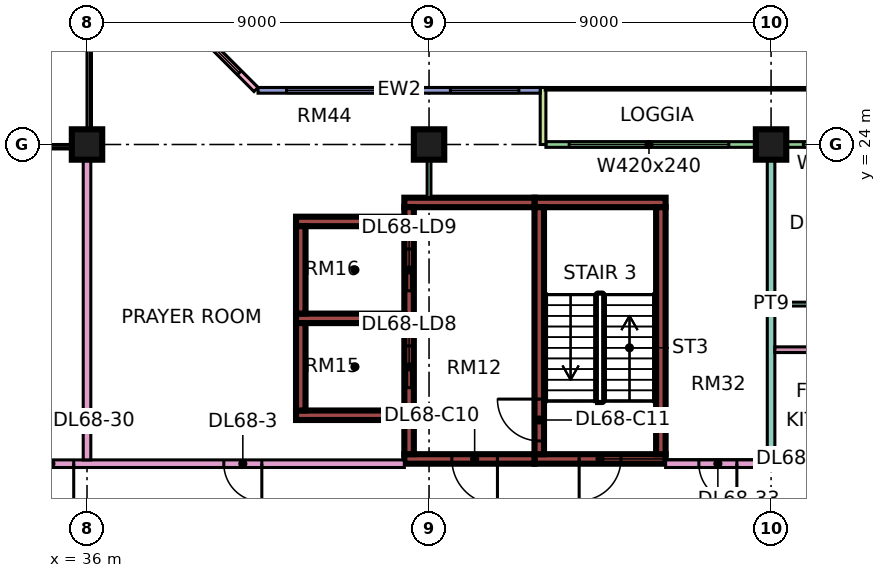
"""IFC4 building model, lengths in metres.
Left out: names, types, materials, properties, quantities, classifications, styles, units other than length and angle.
Written with IfcOpenShell. Run it as: python <this file> out.ifc"""

import sys

from ifc_helpers import new_model, si_unit, direction, frame, frame_2d, origin, origin_2d, place, context, subcontext, project, spatial, rectangle, extrude, element, fill, save


model = new_model("IFC4")
c1 = context("Model", 3, precision=1e-05, world=origin(), true_north=direction((0.0, 1.0)))
c2 = subcontext(c1, "Body", "Model", "MODEL_VIEW")
j1 = project(units=[si_unit("LENGTHUNIT", "METRE"), si_unit("PLANEANGLEUNIT", "RADIAN")], contexts=[c1])
p1 = place(None, origin())
s1 = spatial("IfcSite", under=j1, at=p1, CompositionType="ELEMENT")
p2 = place(p1, origin())
s2 = spatial("IfcBuilding", under=s1, at=p2, CompositionType="ELEMENT")
p3 = place(p2, frame((0.0, 0.0, 292.15)))
s3 = spatial("IfcBuildingStorey", under=s2, at=p3, CompositionType="ELEMENT", Elevation=292.15)
for number, where, z_axis, x_axis in (
    (1, (36.0, 24.0, 0.0), (0.0, 0.0, 1.0), (1.0, 0.0, 0.0)),
    (2, (45.0, 24.0, 0.0), (0.0, 0.0, 1.0), (1.0, 0.0, 0.0)),
    (3, (54.0, 24.0, 0.0), (0.0, 0.0, 1.0), (1.0, 0.0, 0.0)),
):
    element("IfcColumn", number, at=place(p3, frame(where, z_axis=z_axis, x_axis=x_axis)), inside=s3, PredefinedType="COLUMN", context=c2, shape_type="SweptSolid", body=[
        extrude(rectangle(XDim=0.8, YDim=0.8, at=origin_2d()), origin(), (0.0, 0.0, 1.0), 3.75),
    ])
p4 = place(p3, frame((47.775, 15.725, 0.0), z_axis=(0.0, 0.0, 1.0), x_axis=(1.0, 0.0, 0.0)))
e4 = element("IfcWall", 4, at=p4, inside=s3, PredefinedType="SHEAR", context=c2, shape_type="SweptSolid", body=[
    extrude(rectangle(XDim=3.45, YDim=0.25, at=frame_2d((1.725, 0.0))), origin(), (0.0, 0.0, 1.0), 3.75),
])
p5 = place(p4, frame((1.175, 0.0, 0.0)))
e5 = element("IfcOpeningElement", 5, at=p5, cuts=e4, PredefinedType="OPENING", context=c2, shape_type="SweptSolid", body=[
    extrude(rectangle(XDim=1.1, YDim=2.2, at=frame_2d((0.55, 1.1))), frame((0.0, 0.135, 0.0), z_axis=(0.0, -1.0, 0.0), x_axis=(1.0, 0.0, 0.0)), (0.0, 0.0, 1.0), 0.27),
])
p6 = place(p3, frame((47.775, 22.475, 0.0), z_axis=(0.0, 0.0, 1.0), x_axis=(1.0, 0.0, 0.0)))
e6 = element("IfcWall", 6, at=p6, inside=s3, PredefinedType="SHEAR", context=c2, shape_type="SweptSolid", body=[
    extrude(rectangle(XDim=3.45, YDim=0.25, at=frame_2d((1.725, 0.0))), origin(), (0.0, 0.0, 1.0), 3.75),
])
p7 = place(p3, frame((47.9, 15.85, 0.0), z_axis=(0.0, 0.0, 1.0), x_axis=(0.0, 1.0, 0.0)))
e7 = element("IfcWall", 7, at=p7, inside=s3, PredefinedType="SHEAR", context=c2, shape_type="SweptSolid", body=[
    extrude(rectangle(XDim=6.5, YDim=0.25, at=frame_2d((3.25, 0.0))), origin(), (0.0, 0.0, 1.0), 3.75),
])
p8 = place(p7, frame((0.35, 0.0, 0.0)))
e8 = element("IfcOpeningElement", 8, at=p8, cuts=e7, PredefinedType="OPENING", context=c2, shape_type="SweptSolid", body=[
    extrude(rectangle(XDim=1.1, YDim=2.2, at=frame_2d((0.55, 1.1))), frame((0.0, 0.135, 0.0), z_axis=(0.0, -1.0, 0.0), x_axis=(1.0, 0.0, 0.0)), (0.0, 0.0, 1.0), 0.27),
])
p9 = place(p3, frame((51.1, 15.85, 0.0), z_axis=(0.0, 0.0, 1.0), x_axis=(0.0, 1.0, 0.0)))
e9 = element("IfcWall", 9, at=p9, inside=s3, PredefinedType="SHEAR", context=c2, shape_type="SweptSolid", body=[
    extrude(rectangle(XDim=6.5, YDim=0.25, at=frame_2d((3.25, 0.0))), origin(), (0.0, 0.0, 1.0), 3.75),
])
p10 = place(p3, frame((44.35, 15.725, 0.0), z_axis=(0.0, 0.0, 1.0), x_axis=(1.0, 0.0, 0.0)))
e10 = element("IfcWall", 10, at=p10, inside=s3, PredefinedType="SHEAR", context=c2, shape_type="SweptSolid", body=[
    extrude(rectangle(XDim=3.425, YDim=0.25, at=frame_2d((1.712, 0.0))), origin(), (0.0, 0.0, 1.0), 3.75),
])
p11 = place(p10, frame((1.25, 0.0, 0.0)))
e11 = element("IfcOpeningElement", 11, at=p11, cuts=e10, PredefinedType="OPENING", context=c2, shape_type="SweptSolid", body=[
    extrude(rectangle(XDim=1.2, YDim=2.2, at=frame_2d((0.6, 1.1))), frame((0.0, 0.135, 0.0), z_axis=(0.0, -1.0, 0.0), x_axis=(1.0, 0.0, 0.0)), (0.0, 0.0, 1.0), 0.27),
])
p12 = place(p3, frame((44.35, 22.475, 0.0), z_axis=(0.0, 0.0, 1.0), x_axis=(1.0, 0.0, 0.0)))
e12 = element("IfcWall", 12, at=p12, inside=s3, PredefinedType="SHEAR", context=c2, shape_type="SweptSolid", body=[
    extrude(rectangle(XDim=3.425, YDim=0.25, at=frame_2d((1.712, 0.0))), origin(), (0.0, 0.0, 1.0), 3.75),
])
p13 = place(p3, frame((44.475, 15.85, 0.0), z_axis=(0.0, 0.0, 1.0), x_axis=(0.0, 1.0, 0.0)))
e13 = element("IfcWall", 13, at=p13, inside=s3, PredefinedType="SHEAR", context=c2, shape_type="SweptSolid", body=[
    extrude(rectangle(XDim=6.5, YDim=0.25, at=frame_2d((3.25, 0.0))), origin(), (0.0, 0.0, 1.0), 3.75),
])
p14 = place(p13, frame((1.75, 0.0, 0.0)))
e14 = element("IfcOpeningElement", 14, at=p14, cuts=e13, PredefinedType="OPENING", context=c2, shape_type="SweptSolid", body=[
    extrude(rectangle(XDim=1.1, YDim=2.2, at=frame_2d((0.55, 1.1))), frame((0.0, 0.135, 0.0), z_axis=(0.0, -1.0, 0.0), x_axis=(1.0, 0.0, 0.0)), (0.0, 0.0, 1.0), 0.27),
])
p15 = place(p13, frame((4.3, 0.0, 0.0)))
e15 = element("IfcOpeningElement", 15, at=p15, cuts=e13, PredefinedType="OPENING", context=c2, shape_type="SweptSolid", body=[
    extrude(rectangle(XDim=1.1, YDim=2.2, at=frame_2d((0.55, 1.1))), frame((0.0, 0.135, 0.0), z_axis=(0.0, -1.0, 0.0), x_axis=(1.0, 0.0, 0.0)), (0.0, 0.0, 1.0), 0.27),
])
for number, where, z_axis, x_axis in (
    (16, (41.5, 16.875, 0.0), (0.0, 0.0, 1.0), (1.0, 0.0, 0.0)),
    (17, (41.5, 19.425, 0.0), (0.0, 0.0, 1.0), (1.0, 0.0, 0.0)),
    (18, (41.5, 21.975, 0.0), (0.0, 0.0, 1.0), (1.0, 0.0, 0.0)),
):
    element("IfcWall", number, at=place(p3, frame(where, z_axis=z_axis, x_axis=x_axis)), inside=s3, PredefinedType="SHEAR", context=c2, shape_type="SweptSolid", body=[
        extrude(rectangle(XDim=2.85, YDim=0.25, at=frame_2d((1.425, 0.0))), origin(), (0.0, 0.0, 1.0), 3.75),
    ])
for number, where, z_axis, x_axis in (
    (19, (41.625, 17.0, 0.0), (0.0, 0.0, 1.0), (0.0, 1.0, 0.0)),
    (20, (41.625, 19.55, 0.0), (0.0, 0.0, 1.0), (0.0, 1.0, 0.0)),
):
    element("IfcWall", number, at=place(p3, frame(where, z_axis=z_axis, x_axis=x_axis)), inside=s3, PredefinedType="SHEAR", context=c2, shape_type="SweptSolid", body=[
        extrude(rectangle(XDim=2.3, YDim=0.25, at=frame_2d((1.15, 0.0))), origin(), (0.0, 0.0, 1.0), 3.75),
    ])
p16 = place(p3, frame((61.425, 24.0, 0.0), z_axis=(0.0, 0.0, 1.0), x_axis=(-1.0, 0.0, 0.0)))
e21 = element("IfcWall", 21, at=p16, inside=s3, PredefinedType="SOLIDWALL", context=c2, shape_type="SweptSolid", body=[
    extrude(rectangle(XDim=13.35, YDim=0.15, at=frame_2d((6.675, 0.0))), origin(), (0.0, 0.0, 1.0), 3.35),
])
p17 = place(p16, frame((0.262, 0.0, 0.45)))
e22 = element("IfcOpeningElement", 22, at=p17, cuts=e21, PredefinedType="OPENING", context=c2, shape_type="SweptSolid", body=[
    extrude(rectangle(XDim=0.9, YDim=2.4, at=frame_2d((0.45, 1.2))), frame((0.0, 0.085, 0.0), z_axis=(0.0, -1.0, 0.0), x_axis=(1.0, 0.0, 0.0)), (0.0, 0.0, 1.0), 0.17),
])
p18 = place(p16, frame((2.025, 0.0, 0.0)))
e23 = element("IfcOpeningElement", 23, at=p18, cuts=e21, PredefinedType="OPENING", context=c2, shape_type="SweptSolid", body=[
    extrude(rectangle(XDim=1.8, YDim=2.4, at=frame_2d((0.9, 1.2))), frame((0.0, 0.085, 0.0), z_axis=(0.0, -1.0, 0.0), x_axis=(1.0, 0.0, 0.0)), (0.0, 0.0, 1.0), 0.17),
])
p19 = place(p16, frame((4.775, 0.0, 0.45)))
e24 = element("IfcOpeningElement", 24, at=p19, cuts=e21, PredefinedType="OPENING", context=c2, shape_type="SweptSolid", body=[
    extrude(rectangle(XDim=1.8, YDim=2.4, at=frame_2d((0.9, 1.2))), frame((0.0, 0.085, 0.0), z_axis=(0.0, -1.0, 0.0), x_axis=(1.0, 0.0, 0.0)), (0.0, 0.0, 1.0), 0.17),
])
p20 = place(p16, frame((8.538, 0.0, 0.45)))
e25 = element("IfcOpeningElement", 25, at=p20, cuts=e21, PredefinedType="OPENING", context=c2, shape_type="SweptSolid", body=[
    extrude(rectangle(XDim=4.2, YDim=2.4, at=frame_2d((2.1, 1.2))), frame((0.0, 0.085, 0.0), z_axis=(0.0, -1.0, 0.0), x_axis=(1.0, 0.0, 0.0)), (0.0, 0.0, 1.0), 0.17),
])
p21 = place(p3, frame((48.0, 25.5, 0.0), z_axis=(0.0, 0.0, 1.0), x_axis=(0.0, -1.0, 0.0)))
e26 = element("IfcWall", 26, at=p21, inside=s3, PredefinedType="SOLIDWALL", context=c2, shape_type="SweptSolid", body=[
    extrude(rectangle(XDim=1.5, YDim=0.15, at=frame_2d((0.75, 0.0))), origin(), (0.0, 0.0, 1.0), 3.35),
])
p22 = place(p3, frame((47.925, 25.425, 0.0), z_axis=(0.0, 0.0, 1.0), x_axis=(-1.0, 0.0, 0.0)))
e27 = element("IfcWall", 27, at=p22, inside=s3, PredefinedType="SOLIDWALL", context=c2, shape_type="SweptSolid", body=[
    extrude(rectangle(XDim=7.425, YDim=0.15, at=frame_2d((3.712, 0.0))), origin(), (0.0, 0.0, 1.0), 3.35),
])
p23 = place(p22, frame((0.562, 0.0, 0.45)))
e28 = element("IfcOpeningElement", 28, at=p23, cuts=e27, PredefinedType="OPENING", context=c2, shape_type="SweptSolid", body=[
    extrude(rectangle(XDim=1.8, YDim=2.4, at=frame_2d((0.9, 1.2))), frame((0.0, 0.085, 0.0), z_axis=(0.0, -1.0, 0.0), x_axis=(1.0, 0.0, 0.0)), (0.0, 0.0, 1.0), 0.17),
])
p24 = place(p22, frame((3.675, 0.0, 0.45)))
e29 = element("IfcOpeningElement", 29, at=p24, cuts=e27, PredefinedType="OPENING", context=c2, shape_type="SweptSolid", body=[
    extrude(rectangle(XDim=3.0, YDim=2.4, at=frame_2d((1.5, 1.2))), frame((0.0, 0.085, 0.0), z_axis=(0.0, -1.0, 0.0), x_axis=(1.0, 0.0, 0.0)), (0.0, 0.0, 1.0), 0.17),
])
p25 = place(p3, frame((40.447, 25.447, 0.0), z_axis=(0.0, 0.0, 1.0), x_axis=(-0.707106781187, 0.707106781187, 0.0)))
e30 = element("IfcWall", 30, at=p25, inside=s3, PredefinedType="SOLIDWALL", context=c2, shape_type="SweptSolid", body=[
    extrude(rectangle(XDim=4.243, YDim=0.15, at=frame_2d((2.121, 0.0))), origin(), (0.0, 0.0, 1.0), 3.35),
])
p26 = place(p25, frame((0.621, 0.0, 0.45)))
e31 = element("IfcOpeningElement", 31, at=p26, cuts=e30, PredefinedType="OPENING", context=c2, shape_type="SweptSolid", body=[
    extrude(rectangle(XDim=3.0, YDim=2.4, at=frame_2d((1.5, 1.2))), frame((0.0, 0.085, 0.0), z_axis=(0.0, -1.0, 0.0), x_axis=(1.0, 0.0, 0.0)), (0.0, 0.0, 1.0), 0.17),
])
p27 = place(p3, frame((34.0, 15.6, 0.0), z_axis=(0.0, 0.0, 1.0), x_axis=(1.0, 0.0, 0.0)))
e32 = element("IfcWall", 32, at=p27, inside=s3, PredefinedType="PARTITIONING", context=c2, shape_type="SweptSolid", body=[
    extrude(rectangle(XDim=10.35, YDim=0.2, at=frame_2d((5.175, 0.0))), origin(), (0.0, 0.0, 1.0), 3.35),
])
p28 = place(p27, frame((5.6, 0.0, 0.0)))
e33 = element("IfcOpeningElement", 33, at=p28, cuts=e32, PredefinedType="OPENING", context=c2, shape_type="SweptSolid", body=[
    extrude(rectangle(XDim=1.0, YDim=2.1, at=frame_2d((0.5, 1.05))), frame((0.0, 0.11, 0.0), z_axis=(0.0, -1.0, 0.0), x_axis=(1.0, 0.0, 0.0)), (0.0, 0.0, 1.0), 0.22),
])
p29 = place(p27, frame((0.45, 0.0, 0.0)))
e34 = element("IfcOpeningElement", 34, at=p29, cuts=e32, PredefinedType="OPENING", context=c2, shape_type="SweptSolid", body=[
    extrude(rectangle(XDim=1.2, YDim=2.1, at=frame_2d((0.6, 1.05))), frame((0.0, 0.11, 0.0), z_axis=(0.0, -1.0, 0.0), x_axis=(1.0, 0.0, 0.0)), (0.0, 0.0, 1.0), 0.22),
])
p30 = place(p3, frame((36.0, 15.7, 0.0), z_axis=(0.0, 0.0, 1.0), x_axis=(0.0, 1.0, 0.0)))
e35 = element("IfcWall", 35, at=p30, inside=s3, PredefinedType="PARTITIONING", context=c2, shape_type="SweptSolid", body=[
    extrude(rectangle(XDim=8.3, YDim=0.2, at=frame_2d((4.15, 0.0))), origin(), (0.0, 0.0, 1.0), 3.35),
])
p31 = place(p3, frame((45.0, 22.6, 0.0), z_axis=(0.0, 0.0, 1.0), x_axis=(0.0, 1.0, 0.0)))
e36 = element("IfcWall", 36, at=p31, inside=s3, PredefinedType="PARTITIONING", context=c2, shape_type="SweptSolid", body=[
    extrude(rectangle(XDim=1.4, YDim=0.1, at=frame_2d((0.7, 0.0))), origin(), (0.0, 0.0, 1.0), 3.35),
])
p32 = place(p3, frame((51.225, 15.6, 0.0), z_axis=(0.0, 0.0, 1.0), x_axis=(1.0, 0.0, 0.0)))
e37 = element("IfcWall", 37, at=p32, inside=s3, PredefinedType="PARTITIONING", context=c2, shape_type="SweptSolid", body=[
    extrude(rectangle(XDim=13.125, YDim=0.2, at=frame_2d((6.562, 0.0))), origin(), (0.0, 0.0, 1.0), 3.35),
])
p33 = place(p32, frame((9.725, 0.0, 0.0)))
e38 = element("IfcOpeningElement", 38, at=p33, cuts=e37, PredefinedType="OPENING", context=c2, shape_type="SweptSolid", body=[
    extrude(rectangle(XDim=1.0, YDim=2.1, at=frame_2d((0.5, 1.05))), frame((0.0, 0.11, 0.0), z_axis=(0.0, -1.0, 0.0), x_axis=(1.0, 0.0, 0.0)), (0.0, 0.0, 1.0), 0.22),
])
p34 = place(p32, frame((0.875, 0.0, 0.0)))
e39 = element("IfcOpeningElement", 39, at=p34, cuts=e37, PredefinedType="OPENING", context=c2, shape_type="SweptSolid", body=[
    extrude(rectangle(XDim=1.0, YDim=2.1, at=frame_2d((0.5, 1.05))), frame((0.0, 0.11, 0.0), z_axis=(0.0, -1.0, 0.0), x_axis=(1.0, 0.0, 0.0)), (0.0, 0.0, 1.0), 0.22),
])
p35 = place(p3, frame((54.0, 15.7, 0.0), z_axis=(0.0, 0.0, 1.0), x_axis=(0.0, 1.0, 0.0)))
e40 = element("IfcWall", 40, at=p35, inside=s3, PredefinedType="PARTITIONING", context=c2, shape_type="SweptSolid", body=[
    extrude(rectangle(XDim=8.226, YDim=0.2, at=frame_2d((4.113, 0.0))), origin(), (0.0, 0.0, 1.0), 3.35),
])
p36 = place(p3, frame((54.1, 18.6, 0.0), z_axis=(0.0, 0.0, 1.0), x_axis=(1.0, 0.0, 0.0)))
e41 = element("IfcWall", 41, at=p36, inside=s3, PredefinedType="PARTITIONING", context=c2, shape_type="SweptSolid", body=[
    extrude(rectangle(XDim=5.975, YDim=0.15, at=frame_2d((2.987, 0.0))), origin(), (0.0, 0.0, 1.0), 3.35),
])
p37 = place(p36, frame((3.95, 0.0, 0.0)))
e42 = element("IfcOpeningElement", 42, at=p37, cuts=e41, PredefinedType="OPENING", context=c2, shape_type="SweptSolid", body=[
    extrude(rectangle(XDim=0.8, YDim=2.1, at=frame_2d((0.4, 1.05))), frame((0.0, 0.085, 0.0), z_axis=(0.0, -1.0, 0.0), x_axis=(1.0, 0.0, 0.0)), (0.0, 0.0, 1.0), 0.17),
])
p38 = place(p36, frame((0.95, 0.0, 0.0)))
e43 = element("IfcOpeningElement", 43, at=p38, cuts=e41, PredefinedType="OPENING", context=c2, shape_type="SweptSolid", body=[
    extrude(rectangle(XDim=0.9, YDim=2.1, at=frame_2d((0.45, 1.05))), frame((0.0, 0.085, 0.0), z_axis=(0.0, -1.0, 0.0), x_axis=(1.0, 0.0, 0.0)), (0.0, 0.0, 1.0), 0.17),
])
p39 = place(p3, frame((54.1, 19.8, 0.0), z_axis=(0.0, 0.0, 1.0), x_axis=(1.0, 0.0, 0.0)))
e44 = element("IfcWall", 44, at=p39, inside=s3, PredefinedType="PARTITIONING", context=c2, shape_type="SweptSolid", body=[
    extrude(rectangle(XDim=2.85, YDim=0.1, at=frame_2d((1.425, 0.0))), origin(), (0.0, 0.0, 1.0), 3.35),
])
p40 = place(p19, origin())
e45 = element("IfcWindow", 45, at=p40, inside=s3, PartitioningType="SINGLE_PANEL", PredefinedType="WINDOW", context=c2, shape_type="SweptSolid", body=[
    extrude(rectangle(XDim=1.8, YDim=2.4, at=frame_2d((0.9, 1.2))), frame((0.0, 0.03, 0.0), z_axis=(0.0, -1.0, 0.0), x_axis=(1.0, 0.0, 0.0)), (0.0, 0.0, 1.0), 0.06),
])
fill(e24, e45)
p41 = place(p20, origin())
e46 = element("IfcWindow", 46, at=p41, inside=s3, PartitioningType="SINGLE_PANEL", PredefinedType="WINDOW", context=c2, shape_type="SweptSolid", body=[
    extrude(rectangle(XDim=4.2, YDim=2.4, at=frame_2d((2.1, 1.2))), frame((0.0, 0.03, 0.0), z_axis=(0.0, -1.0, 0.0), x_axis=(1.0, 0.0, 0.0)), (0.0, 0.0, 1.0), 0.06),
])
fill(e25, e46)
p42 = place(p23, origin())
e47 = element("IfcWindow", 47, at=p42, inside=s3, PartitioningType="SINGLE_PANEL", PredefinedType="WINDOW", context=c2, shape_type="SweptSolid", body=[
    extrude(rectangle(XDim=1.8, YDim=2.4, at=frame_2d((0.9, 1.2))), frame((0.0, 0.03, 0.0), z_axis=(0.0, -1.0, 0.0), x_axis=(1.0, 0.0, 0.0)), (0.0, 0.0, 1.0), 0.06),
])
fill(e28, e47)
p43 = place(p24, origin())
e48 = element("IfcWindow", 48, at=p43, inside=s3, PartitioningType="SINGLE_PANEL", PredefinedType="WINDOW", context=c2, shape_type="SweptSolid", body=[
    extrude(rectangle(XDim=3.0, YDim=2.4, at=frame_2d((1.5, 1.2))), frame((0.0, 0.03, 0.0), z_axis=(0.0, -1.0, 0.0), x_axis=(1.0, 0.0, 0.0)), (0.0, 0.0, 1.0), 0.06),
])
fill(e29, e48)
p44 = place(p26, origin())
e49 = element("IfcWindow", 49, at=p44, inside=s3, PartitioningType="SINGLE_PANEL", PredefinedType="WINDOW", context=c2, shape_type="SweptSolid", body=[
    extrude(rectangle(XDim=3.0, YDim=2.4, at=frame_2d((1.5, 1.2))), frame((0.0, 0.03, 0.0), z_axis=(0.0, -1.0, 0.0), x_axis=(1.0, 0.0, 0.0)), (0.0, 0.0, 1.0), 0.06),
])
fill(e31, e49)
p45 = place(p5, frame((1.1, 0.0, 0.0), z_axis=(0.0, 0.0, 1.0), x_axis=(-1.0, 0.0, 0.0)))
e50 = element("IfcDoor", 50, at=p45, inside=s3, OperationType="SINGLE_SWING_LEFT", PredefinedType="DOOR", context=c2, shape_type="SweptSolid", body=[
    extrude(rectangle(XDim=1.1, YDim=2.2, at=frame_2d((0.55, 1.1))), frame((0.0, 0.025, 0.0), z_axis=(0.0, -1.0, 0.0), x_axis=(1.0, 0.0, 0.0)), (0.0, 0.0, 1.0), 0.05),
])
fill(e5, e50)
p46 = place(p11, origin())
e51 = element("IfcDoor", 51, at=p46, inside=s3, OperationType="SINGLE_SWING_RIGHT", PredefinedType="DOOR", context=c2, shape_type="SweptSolid", body=[
    extrude(rectangle(XDim=1.2, YDim=2.2, at=frame_2d((0.6, 1.1))), frame((0.0, 0.025, 0.0), z_axis=(0.0, -1.0, 0.0), x_axis=(1.0, 0.0, 0.0)), (0.0, 0.0, 1.0), 0.05),
])
fill(e11, e51)
p47 = place(p8, frame((1.1, 0.0, 0.0), z_axis=(0.0, 0.0, 1.0), x_axis=(-1.0, 0.0, 0.0)))
e52 = element("IfcDoor", 52, at=p47, inside=s3, OperationType="SINGLE_SWING_RIGHT", PredefinedType="DOOR", context=c2, shape_type="SweptSolid", body=[
    extrude(rectangle(XDim=1.1, YDim=2.2, at=frame_2d((0.55, 1.1))), frame((0.0, 0.025, 0.0), z_axis=(0.0, -1.0, 0.0), x_axis=(1.0, 0.0, 0.0)), (0.0, 0.0, 1.0), 0.05),
])
fill(e8, e52)
p48 = place(p14, origin())
e53 = element("IfcDoor", 53, at=p48, inside=s3, OperationType="DOUBLE_DOOR_SLIDING", PredefinedType="DOOR", context=c2, shape_type="SweptSolid", body=[
    extrude(rectangle(XDim=1.1, YDim=2.2, at=frame_2d((0.55, 1.1))), frame((0.0, 0.025, 0.0), z_axis=(0.0, -1.0, 0.0), x_axis=(1.0, 0.0, 0.0)), (0.0, 0.0, 1.0), 0.05),
])
fill(e14, e53)
p49 = place(p15, origin())
e54 = element("IfcDoor", 54, at=p49, inside=s3, OperationType="DOUBLE_DOOR_SLIDING", PredefinedType="DOOR", context=c2, shape_type="SweptSolid", body=[
    extrude(rectangle(XDim=1.1, YDim=2.2, at=frame_2d((0.55, 1.1))), frame((0.0, 0.025, 0.0), z_axis=(0.0, -1.0, 0.0), x_axis=(1.0, 0.0, 0.0)), (0.0, 0.0, 1.0), 0.05),
])
fill(e15, e54)
p50 = place(p28, origin())
e55 = element("IfcDoor", 55, at=p50, inside=s3, OperationType="SINGLE_SWING_RIGHT", PredefinedType="DOOR", context=c2, shape_type="SweptSolid", body=[
    extrude(rectangle(XDim=1.0, YDim=2.1, at=frame_2d((0.5, 1.05))), frame((0.0, 0.025, 0.0), z_axis=(0.0, -1.0, 0.0), x_axis=(1.0, 0.0, 0.0)), (0.0, 0.0, 1.0), 0.05),
])
fill(e33, e55)
p51 = place(p29, origin())
e56 = element("IfcDoor", 56, at=p51, inside=s3, OperationType="SINGLE_SWING_RIGHT", PredefinedType="DOOR", context=c2, shape_type="SweptSolid", body=[
    extrude(rectangle(XDim=1.2, YDim=2.1, at=frame_2d((0.6, 1.05))), frame((0.0, 0.025, 0.0), z_axis=(0.0, -1.0, 0.0), x_axis=(1.0, 0.0, 0.0)), (0.0, 0.0, 1.0), 0.05),
])
fill(e34, e56)
p52 = place(p34, origin())
e57 = element("IfcDoor", 57, at=p52, inside=s3, OperationType="SINGLE_SWING_RIGHT", PredefinedType="DOOR", context=c2, shape_type="SweptSolid", body=[
    extrude(rectangle(XDim=1.0, YDim=2.1, at=frame_2d((0.5, 1.05))), frame((0.0, 0.025, 0.0), z_axis=(0.0, -1.0, 0.0), x_axis=(1.0, 0.0, 0.0)), (0.0, 0.0, 1.0), 0.05),
])
fill(e39, e57)
save(model, sys.argv[1])
